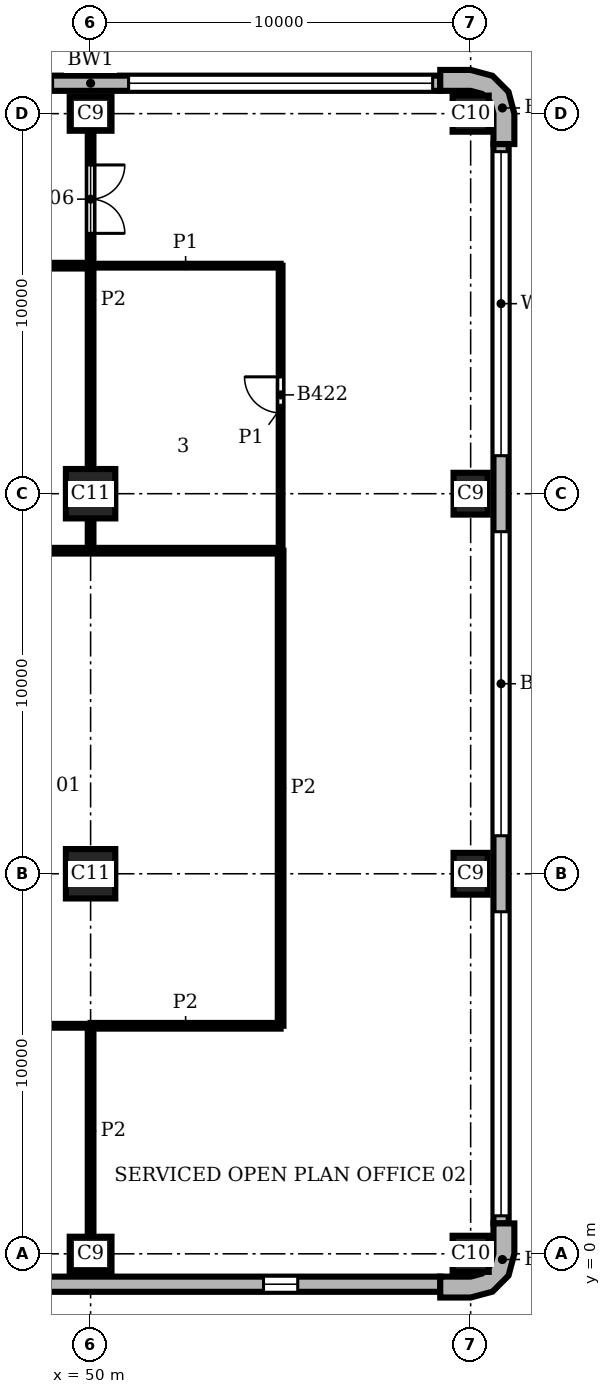
"""IFC4 building model, lengths in metres.
Left out: names, types, materials, properties, quantities, classifications, styles, units other than length and angle.
Written with IfcOpenShell. Run it as: python <this file> out.ifc"""

import sys

from ifc_helpers import new_model, si_unit, direction, frame, frame_2d, origin, origin_2d, place, context, subcontext, project, spatial, polyline, rectangle, outline, extrude, element, fill, save


model = new_model("IFC4")
c1 = context("Model", 3, precision=1e-05, world=origin(), true_north=direction((0.0, 1.0)))
c2 = subcontext(c1, "Body", "Model", "MODEL_VIEW")
j1 = project(units=[si_unit("LENGTHUNIT", "METRE"), si_unit("PLANEANGLEUNIT", "RADIAN")], contexts=[c1])
p1 = place(None, origin())
s1 = spatial("IfcSite", under=j1, at=p1, CompositionType="ELEMENT")
p2 = place(p1, origin())
s2 = spatial("IfcBuilding", under=s1, at=p2, CompositionType="ELEMENT")
p3 = place(p2, frame((0.0, 0.0, 170.7)))
s3 = spatial("IfcBuildingStorey", under=s2, at=p3, CompositionType="ELEMENT", Elevation=170.7)
p4 = place(p3, frame((50.0, 0.0, 0.0), z_axis=(0.0, 0.0, 1.0), x_axis=(1.0, 0.0, 0.0)))
e1 = element("IfcColumn", 1, at=p4, inside=s3, PredefinedType="COLUMN", context=c2, shape_type="SweptSolid", body=[
    extrude(rectangle(XDim=1.1, YDim=0.9, at=origin_2d()), origin(), (0.0, 0.0, 1.0), 3.9),
])
p5 = place(p3, frame((60.0, 0.0, 0.0), z_axis=(0.0, 0.0, 1.0), x_axis=(1.0, 0.0, 0.0)))
e2 = element("IfcColumn", 2, at=p5, inside=s3, PredefinedType="COLUMN", context=c2, shape_type="SweptSolid", body=[
    extrude(rectangle(XDim=0.95, YDim=0.95, at=origin_2d()), origin(), (0.0, 0.0, 1.0), 3.9),
])
for number, where, z_axis, x_axis in (
    (3, (60.0, 10.0, 0.0), (0.0, 0.0, 1.0), (0.0, 1.0, 0.0)),
    (4, (60.0, 20.0, 0.0), (0.0, 0.0, 1.0), (0.0, 1.0, 0.0)),
):
    element("IfcColumn", number, at=place(p3, frame(where, z_axis=z_axis, x_axis=x_axis)), inside=s3, PredefinedType="COLUMN", context=c2, shape_type="SweptSolid", body=[
        extrude(rectangle(XDim=1.1, YDim=0.9, at=origin_2d()), origin(), (0.0, 0.0, 1.0), 3.9),
    ])
p6 = place(p3, frame((60.0, 30.0, 0.0), z_axis=(0.0, 0.0, 1.0), x_axis=(1.0, 0.0, 0.0)))
e5 = element("IfcColumn", 5, at=p6, inside=s3, PredefinedType="COLUMN", context=c2, shape_type="SweptSolid", body=[
    extrude(rectangle(XDim=0.95, YDim=0.95, at=origin_2d()), origin(), (0.0, 0.0, 1.0), 3.9),
])
p7 = place(p3, frame((50.0, 30.0, 0.0), z_axis=(0.0, 0.0, 1.0), x_axis=(1.0, 0.0, 0.0)))
e6 = element("IfcColumn", 6, at=p7, inside=s3, PredefinedType="COLUMN", context=c2, shape_type="SweptSolid", body=[
    extrude(rectangle(XDim=1.1, YDim=0.9, at=origin_2d()), origin(), (0.0, 0.0, 1.0), 3.9),
])
for number, where, z_axis, x_axis in (
    (7, (50.0, 10.0, 0.0), (0.0, 0.0, 1.0), (1.0, 0.0, 0.0)),
    (8, (50.0, 20.0, 0.0), (0.0, 0.0, 1.0), (1.0, 0.0, 0.0)),
):
    element("IfcColumn", number, at=place(p3, frame(where, z_axis=z_axis, x_axis=x_axis)), inside=s3, PredefinedType="COLUMN", context=c2, shape_type="SweptSolid", body=[
        extrude(rectangle(XDim=1.3, YDim=1.3, at=origin_2d()), origin(), (0.0, 0.0, 1.0), 3.9),
    ])
p8 = place(p3, origin())
e9 = element("IfcWall", 9, at=p8, inside=s3, PredefinedType="SOLIDWALL", context=c2, shape_type="SweptSolid", body=[
    extrude(outline(polyline([(59.2, -1.0), (59.2, -1.15), (60.0, -1.15), (60.575, -0.996), (60.996, -0.575), (61.15, 0.0), (61.15, 0.8), (61.0, 0.8), (60.6, 0.8), (60.6, 0.0), (60.52, -0.3), (60.3, -0.52), (60.0, -0.6), (59.2, -0.6), (59.2, -1.0)])), origin(), (0.0, 0.0, 1.0), 3.9),
])
e10 = element("IfcWall", 10, at=p8, inside=s3, PredefinedType="SOLIDWALL", context=c2, shape_type="SweptSolid", body=[
    extrude(outline(polyline([(61.0, 29.2), (61.15, 29.2), (61.15, 30.0), (60.996, 30.575), (60.575, 30.996), (60.0, 31.15), (59.2, 31.15), (59.2, 31.0), (59.2, 30.6), (60.0, 30.6), (60.3, 30.52), (60.52, 30.3), (60.6, 30.0), (60.6, 29.2), (61.0, 29.2)])), origin(), (0.0, 0.0, 1.0), 3.9),
])
p9 = place(p3, frame((20.8, -0.8, 0.0), z_axis=(0.0, 0.0, 1.0), x_axis=(1.0, 0.0, 0.0)))
e11 = element("IfcWall", 11, at=p9, inside=s3, PredefinedType="SOLIDWALL", context=c2, shape_type="SweptSolid", body=[
    extrude(rectangle(XDim=38.4, YDim=0.4, at=frame_2d((19.2, 0.0))), origin(), (0.0, 0.0, 1.0), 3.9),
])
p10 = place(p9, frame((3.75, 0.0, 0.9)))
e12 = element("IfcOpeningElement", 12, at=p10, cuts=e11, PredefinedType="OPENING", context=c2, shape_type="SweptSolid", body=[
    extrude(rectangle(XDim=0.9, YDim=2.35, at=frame_2d((0.45, 1.175))), frame((0.0, 0.21, 0.0), z_axis=(0.0, -1.0, 0.0), x_axis=(1.0, 0.0, 0.0)), (0.0, 0.0, 1.0), 0.42),
])
p11 = place(p9, frame((13.75, 0.0, 0.9)))
e13 = element("IfcOpeningElement", 13, at=p11, cuts=e11, PredefinedType="OPENING", context=c2, shape_type="SweptSolid", body=[
    extrude(rectangle(XDim=0.9, YDim=2.35, at=frame_2d((0.45, 1.175))), frame((0.0, 0.21, 0.0), z_axis=(0.0, -1.0, 0.0), x_axis=(1.0, 0.0, 0.0)), (0.0, 0.0, 1.0), 0.42),
])
p12 = place(p9, frame((23.75, 0.0, 0.9)))
e14 = element("IfcOpeningElement", 14, at=p12, cuts=e11, PredefinedType="OPENING", context=c2, shape_type="SweptSolid", body=[
    extrude(rectangle(XDim=0.9, YDim=2.35, at=frame_2d((0.45, 1.175))), frame((0.0, 0.21, 0.0), z_axis=(0.0, -1.0, 0.0), x_axis=(1.0, 0.0, 0.0)), (0.0, 0.0, 1.0), 0.42),
])
p13 = place(p9, frame((33.75, 0.0, 0.9)))
e15 = element("IfcOpeningElement", 15, at=p13, cuts=e11, PredefinedType="OPENING", context=c2, shape_type="SweptSolid", body=[
    extrude(rectangle(XDim=0.9, YDim=2.35, at=frame_2d((0.45, 1.175))), frame((0.0, 0.21, 0.0), z_axis=(0.0, -1.0, 0.0), x_axis=(1.0, 0.0, 0.0)), (0.0, 0.0, 1.0), 0.42),
])
p14 = place(p3, frame((60.8, 0.8, 0.0), z_axis=(0.0, 0.0, 1.0), x_axis=(0.0, 1.0, 0.0)))
e16 = element("IfcWall", 16, at=p14, inside=s3, PredefinedType="SOLIDWALL", context=c2, shape_type="SweptSolid", body=[
    extrude(rectangle(XDim=28.4, YDim=0.4, at=frame_2d((14.2, 0.0))), origin(), (0.0, 0.0, 1.0), 3.9),
])
p15 = place(p14, frame((0.2, 0.0, 0.9)))
e17 = element("IfcOpeningElement", 17, at=p15, cuts=e16, PredefinedType="OPENING", context=c2, shape_type="SweptSolid", body=[
    extrude(rectangle(XDim=8.0, YDim=2.35, at=frame_2d((4.0, 1.175))), frame((0.0, 0.21, 0.0), z_axis=(0.0, -1.0, 0.0), x_axis=(1.0, 0.0, 0.0)), (0.0, 0.0, 1.0), 0.42),
])
p16 = place(p14, frame((10.2, 0.0, 0.9)))
e18 = element("IfcOpeningElement", 18, at=p16, cuts=e16, PredefinedType="OPENING", context=c2, shape_type="SweptSolid", body=[
    extrude(rectangle(XDim=8.0, YDim=2.35, at=frame_2d((4.0, 1.175))), frame((0.0, 0.21, 0.0), z_axis=(0.0, -1.0, 0.0), x_axis=(1.0, 0.0, 0.0)), (0.0, 0.0, 1.0), 0.42),
])
p17 = place(p14, frame((20.2, 0.0, 0.9)))
e19 = element("IfcOpeningElement", 19, at=p17, cuts=e16, PredefinedType="OPENING", context=c2, shape_type="SweptSolid", body=[
    extrude(rectangle(XDim=8.0, YDim=2.35, at=frame_2d((4.0, 1.175))), frame((0.0, 0.21, 0.0), z_axis=(0.0, -1.0, 0.0), x_axis=(1.0, 0.0, 0.0)), (0.0, 0.0, 1.0), 0.42),
])
p18 = place(p3, frame((59.2, 30.8, 0.0), z_axis=(0.0, 0.0, 1.0), x_axis=(-1.0, 0.0, 0.0)))
e20 = element("IfcWall", 20, at=p18, inside=s3, PredefinedType="SOLIDWALL", context=c2, shape_type="SweptSolid", body=[
    extrude(rectangle(XDim=18.4, YDim=0.4, at=frame_2d((9.2, 0.0))), origin(), (0.0, 0.0, 1.0), 3.9),
])
p19 = place(p18, frame((0.2, 0.0, 0.9)))
e21 = element("IfcOpeningElement", 21, at=p19, cuts=e20, PredefinedType="OPENING", context=c2, shape_type="SweptSolid", body=[
    extrude(rectangle(XDim=8.0, YDim=2.35, at=frame_2d((4.0, 1.175))), frame((0.0, 0.21, 0.0), z_axis=(0.0, -1.0, 0.0), x_axis=(1.0, 0.0, 0.0)), (0.0, 0.0, 1.0), 0.42),
])
p20 = place(p18, frame((10.2, 0.0, 0.9)))
e22 = element("IfcOpeningElement", 22, at=p20, cuts=e20, PredefinedType="OPENING", context=c2, shape_type="SweptSolid", body=[
    extrude(rectangle(XDim=8.0, YDim=2.35, at=frame_2d((4.0, 1.175))), frame((0.0, 0.21, 0.0), z_axis=(0.0, -1.0, 0.0), x_axis=(1.0, 0.0, 0.0)), (0.0, 0.0, 1.0), 0.42),
])
p21 = place(p3, frame((55.0, 18.5, 0.0), z_axis=(0.0, 0.0, 1.0), x_axis=(0.0, 1.0, 0.0)))
e23 = element("IfcWall", 23, at=p21, inside=s3, PredefinedType="PARTITIONING", context=c2, shape_type="SweptSolid", body=[
    extrude(rectangle(XDim=7.5, YDim=0.1, at=frame_2d((3.75, 0.0))), origin(), (0.0, 0.0, 1.0), 3.58),
])
p22 = place(p21, frame((3.625, 0.0, 0.0)))
e24 = element("IfcOpeningElement", 24, at=p22, cuts=e23, PredefinedType="OPENING", context=c2, shape_type="SweptSolid", body=[
    extrude(rectangle(XDim=0.95, YDim=2.1, at=frame_2d((0.475, 1.05))), frame((0.0, 0.06, 0.0), z_axis=(0.0, -1.0, 0.0), x_axis=(1.0, 0.0, 0.0)), (0.0, 0.0, 1.0), 0.12),
])
p23 = place(p3, frame((40.0, 6.0, 0.0), z_axis=(0.0, 0.0, 1.0), x_axis=(1.0, 0.0, 0.0)))
e25 = element("IfcWall", 25, at=p23, inside=s3, PredefinedType="PARTITIONING", context=c2, shape_type="SweptSolid", body=[
    extrude(rectangle(XDim=10.0, YDim=0.1, at=frame_2d((5.0, 0.0))), origin(), (0.0, 0.0, 1.0), 3.58),
])
p24 = place(p23, frame((5.625, 0.0, 0.0)))
e26 = element("IfcOpeningElement", 26, at=p24, cuts=e25, PredefinedType="OPENING", context=c2, shape_type="SweptSolid", body=[
    extrude(rectangle(XDim=0.95, YDim=2.1, at=frame_2d((0.475, 1.05))), frame((0.0, 0.06, 0.0), z_axis=(0.0, -1.0, 0.0), x_axis=(1.0, 0.0, 0.0)), (0.0, 0.0, 1.0), 0.12),
])
p25 = place(p3, frame((50.0, 26.0, 0.0), z_axis=(0.0, 0.0, 1.0), x_axis=(1.0, 0.0, 0.0)))
e27 = element("IfcWall", 27, at=p25, inside=s3, PredefinedType="PARTITIONING", context=c2, shape_type="SweptSolid", body=[
    extrude(rectangle(XDim=5.0, YDim=0.1, at=frame_2d((2.5, 0.0))), origin(), (0.0, 0.0, 1.0), 3.58),
])
p26 = place(p3, frame((50.0, 0.45, 0.0), z_axis=(0.0, 0.0, 1.0), x_axis=(0.0, 1.0, 0.0)))
e28 = element("IfcWall", 28, at=p26, inside=s3, PredefinedType="PARTITIONING", context=c2, shape_type="SweptSolid", body=[
    extrude(rectangle(XDim=5.55, YDim=0.15, at=frame_2d((2.775, 0.0))), origin(), (0.0, 0.0, 1.0), 3.58),
])
p27 = place(p3, frame((50.0, 18.5, 0.0), z_axis=(0.0, 0.0, 1.0), x_axis=(0.0, 1.0, 0.0)))
e29 = element("IfcWall", 29, at=p27, inside=s3, PredefinedType="PARTITIONING", context=c2, shape_type="SweptSolid", body=[
    extrude(rectangle(XDim=0.85, YDim=0.15, at=frame_2d((0.425, 0.0))), origin(), (0.0, 0.0, 1.0), 3.58),
])
p28 = place(p3, frame((50.0, 20.65, 0.0), z_axis=(0.0, 0.0, 1.0), x_axis=(0.0, 1.0, 0.0)))
e30 = element("IfcWall", 30, at=p28, inside=s3, PredefinedType="PARTITIONING", context=c2, shape_type="SweptSolid", body=[
    extrude(rectangle(XDim=8.9, YDim=0.15, at=frame_2d((4.45, 0.0))), origin(), (0.0, 0.0, 1.0), 3.58),
])
p29 = place(p28, frame((6.2, 0.0, 0.0)))
e31 = element("IfcOpeningElement", 31, at=p29, cuts=e30, PredefinedType="OPENING", context=c2, shape_type="SweptSolid", body=[
    extrude(rectangle(XDim=1.8, YDim=2.1, at=frame_2d((0.9, 1.05))), frame((0.0, 0.085, 0.0), z_axis=(0.0, -1.0, 0.0), x_axis=(1.0, 0.0, 0.0)), (0.0, 0.0, 1.0), 0.17),
])
p30 = place(p3, frame((55.0, 6.0, 0.0), z_axis=(0.0, 0.0, 1.0), x_axis=(0.0, 1.0, 0.0)))
e32 = element("IfcWall", 32, at=p30, inside=s3, PredefinedType="PARTITIONING", context=c2, shape_type="SweptSolid", body=[
    extrude(rectangle(XDim=12.5, YDim=0.15, at=frame_2d((6.25, 0.0))), origin(), (0.0, 0.0, 1.0), 3.58),
])
p31 = place(p3, frame((50.0, 6.0, 0.0), z_axis=(0.0, 0.0, 1.0), x_axis=(1.0, 0.0, 0.0)))
e33 = element("IfcWall", 33, at=p31, inside=s3, PredefinedType="PARTITIONING", context=c2, shape_type="SweptSolid", body=[
    extrude(rectangle(XDim=5.0, YDim=0.15, at=frame_2d((2.5, 0.0))), origin(), (0.0, 0.0, 1.0), 3.58),
])
p32 = place(p3, frame((33.2, 18.5, 0.0), z_axis=(0.0, 0.0, 1.0), x_axis=(1.0, 0.0, 0.0)))
e34 = element("IfcWall", 34, at=p32, inside=s3, PredefinedType="PARTITIONING", context=c2, shape_type="SweptSolid", body=[
    extrude(rectangle(XDim=21.8, YDim=0.15, at=frame_2d((10.9, 0.0))), origin(), (0.0, 0.0, 1.0), 3.58),
])
p33 = place(p3, frame((33.2, 26.0, 0.0), z_axis=(0.0, 0.0, 1.0), x_axis=(1.0, 0.0, 0.0)))
e35 = element("IfcWall", 35, at=p33, inside=s3, PredefinedType="PARTITIONING", context=c2, shape_type="SweptSolid", body=[
    extrude(rectangle(XDim=16.8, YDim=0.15, at=frame_2d((8.4, 0.0))), origin(), (0.0, 0.0, 1.0), 3.58),
])
p34 = place(p33, frame((10.65, 0.0, 0.0)))
e36 = element("IfcOpeningElement", 36, at=p34, cuts=e35, PredefinedType="OPENING", context=c2, shape_type="SweptSolid", body=[
    extrude(rectangle(XDim=1.0, YDim=2.1, at=frame_2d((0.5, 1.05))), frame((0.0, 0.085, 0.0), z_axis=(0.0, -1.0, 0.0), x_axis=(1.0, 0.0, 0.0)), (0.0, 0.0, 1.0), 0.17),
])
p35 = place(p13, origin())
e37 = element("IfcWindow", 37, at=p35, inside=s3, PartitioningType="SINGLE_PANEL", PredefinedType="WINDOW", context=c2, shape_type="SweptSolid", body=[
    extrude(rectangle(XDim=0.9, YDim=2.35, at=frame_2d((0.45, 1.175))), frame((0.0, 0.16, 0.0), z_axis=(0.0, -1.0, 0.0), x_axis=(1.0, 0.0, 0.0)), (0.0, 0.0, 1.0), 0.06),
])
fill(e15, e37)
p36 = place(p15, origin())
e38 = element("IfcWindow", 38, at=p36, inside=s3, PartitioningType="SINGLE_PANEL", PredefinedType="WINDOW", context=c2, shape_type="SweptSolid", body=[
    extrude(rectangle(XDim=8.0, YDim=2.35, at=frame_2d((4.0, 1.175))), frame((0.0, 0.16, 0.0), z_axis=(0.0, -1.0, 0.0), x_axis=(1.0, 0.0, 0.0)), (0.0, 0.0, 1.0), 0.06),
])
fill(e17, e38)
p37 = place(p16, origin())
e39 = element("IfcWindow", 39, at=p37, inside=s3, PartitioningType="SINGLE_PANEL", PredefinedType="WINDOW", context=c2, shape_type="SweptSolid", body=[
    extrude(rectangle(XDim=8.0, YDim=2.35, at=frame_2d((4.0, 1.175))), frame((0.0, 0.16, 0.0), z_axis=(0.0, -1.0, 0.0), x_axis=(1.0, 0.0, 0.0)), (0.0, 0.0, 1.0), 0.06),
])
fill(e18, e39)
p38 = place(p17, origin())
e40 = element("IfcWindow", 40, at=p38, inside=s3, PartitioningType="SINGLE_PANEL", PredefinedType="WINDOW", context=c2, shape_type="SweptSolid", body=[
    extrude(rectangle(XDim=8.0, YDim=2.35, at=frame_2d((4.0, 1.175))), frame((0.0, 0.16, 0.0), z_axis=(0.0, -1.0, 0.0), x_axis=(1.0, 0.0, 0.0)), (0.0, 0.0, 1.0), 0.06),
])
fill(e19, e40)
p39 = place(p19, origin())
e41 = element("IfcWindow", 41, at=p39, inside=s3, PartitioningType="SINGLE_PANEL", PredefinedType="WINDOW", context=c2, shape_type="SweptSolid", body=[
    extrude(rectangle(XDim=8.0, YDim=2.35, at=frame_2d((4.0, 1.175))), frame((0.0, 0.16, 0.0), z_axis=(0.0, -1.0, 0.0), x_axis=(1.0, 0.0, 0.0)), (0.0, 0.0, 1.0), 0.06),
])
fill(e21, e41)
p40 = place(p29, frame((1.8, 0.0, 0.0), z_axis=(0.0, 0.0, 1.0), x_axis=(-1.0, 0.0, 0.0)))
e42 = element("IfcDoor", 42, at=p40, inside=s3, OperationType="DOUBLE_DOOR_SINGLE_SWING", PredefinedType="DOOR", context=c2, shape_type="SweptSolid", body=[
    extrude(rectangle(XDim=1.8, YDim=2.1, at=frame_2d((0.9, 1.05))), frame((0.0, 0.025, 0.0), z_axis=(0.0, -1.0, 0.0), x_axis=(1.0, 0.0, 0.0)), (0.0, 0.0, 1.0), 0.05),
])
fill(e31, e42)
p41 = place(p22, origin())
e43 = element("IfcDoor", 43, at=p41, inside=s3, OperationType="SINGLE_SWING_RIGHT", PredefinedType="DOOR", context=c2, shape_type="SweptSolid", body=[
    extrude(rectangle(XDim=0.95, YDim=2.1, at=frame_2d((0.475, 1.05))), frame((0.0, 0.025, 0.0), z_axis=(0.0, -1.0, 0.0), x_axis=(1.0, 0.0, 0.0)), (0.0, 0.0, 1.0), 0.05),
])
fill(e24, e43)
save(model, sys.argv[1])
